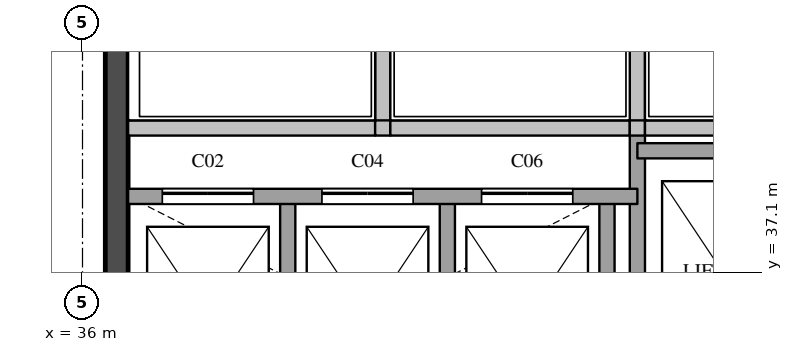
"""IFC4 building model, lengths in metres.
Left out: names, types, materials, properties, quantities, classifications, styles, units other than length and angle.
Written with IfcOpenShell. Run it as: python <this file> out.ifc"""

import sys

from ifc_helpers import new_model, si_unit, direction, frame, frame_2d, origin, place, context, subcontext, project, spatial, rectangle, extrude, element, fill, save


model = new_model("IFC4")
c1 = context("Model", 3, precision=1e-05, world=origin(), true_north=direction((0.0, 1.0)))
c2 = subcontext(c1, "Body", "Model", "MODEL_VIEW")
j1 = project(units=[si_unit("LENGTHUNIT", "METRE"), si_unit("PLANEANGLEUNIT", "RADIAN")], contexts=[c1])
p1 = place(None, origin())
s1 = spatial("IfcSite", under=j1, at=p1, CompositionType="ELEMENT")
p2 = place(p1, origin())
s2 = spatial("IfcBuilding", under=s1, at=p2, CompositionType="ELEMENT")
p3 = place(p2, frame((0.0, 0.0, 301.2)))
s3 = spatial("IfcBuildingStorey", under=s2, at=p3, CompositionType="ELEMENT", Elevation=301.2)
p4 = place(p3, frame((36.45, 29.1, 0.0), z_axis=(0.0, 0.0, 1.0), x_axis=(0.0, 1.0, 0.0)))
e1 = element("IfcWall", 1, at=p4, inside=s3, PredefinedType="SHEAR", context=c2, shape_type="SweptSolid", body=[
    extrude(rectangle(XDim=20.3, YDim=0.3, at=frame_2d((10.15, 0.0))), origin(), (0.0, 0.0, 1.0), 3.6),
])
p5 = place(p4, frame((3.6, 0.0, 0.0)))
e2 = element("IfcOpeningElement", 2, at=p5, cuts=e1, PredefinedType="OPENING", context=c2, shape_type="SweptSolid", body=[
    extrude(rectangle(XDim=1.8, YDim=2.1, at=frame_2d((0.9, 1.05))), frame((0.0, 0.16, 0.0), z_axis=(0.0, -1.0, 0.0), x_axis=(1.0, 0.0, 0.0)), (0.0, 0.0, 1.0), 0.32),
])
p6 = place(p4, frame((16.4, 0.0, 0.0)))
e3 = element("IfcOpeningElement", 3, at=p6, cuts=e1, PredefinedType="OPENING", context=c2, shape_type="SweptSolid", body=[
    extrude(rectangle(XDim=1.0, YDim=2.1, at=frame_2d((0.5, 1.05))), frame((0.0, 0.16, 0.0), z_axis=(0.0, -1.0, 0.0), x_axis=(1.0, 0.0, 0.0)), (0.0, 0.0, 1.0), 0.32),
])
p7 = place(p3, frame((38.7, 34.9, 0.0), z_axis=(0.0, 0.0, 1.0), x_axis=(0.0, 1.0, 0.0)))
e4 = element("IfcWall", 4, at=p7, inside=s3, PredefinedType="SOLIDWALL", context=c2, shape_type="SweptSolid", body=[
    extrude(rectangle(XDim=3.2, YDim=0.2, at=frame_2d((1.6, 0.0))), origin(), (0.0, 0.0, 1.0), 3.6),
])
p8 = place(p3, frame((39.95, 39.0, 0.0), z_axis=(0.0, 0.0, 1.0), x_axis=(0.0, 1.0, 0.0)))
e5 = element("IfcWall", 5, at=p8, inside=s3, PredefinedType="SOLIDWALL", context=c2, shape_type="SweptSolid", body=[
    extrude(rectangle(XDim=1.78, YDim=0.2, at=frame_2d((0.89, 0.0))), origin(), (0.0, 0.0, 1.0), 3.6),
])
for number, where, z_axis, x_axis in (
    (6, (40.8, 34.9, 0.0), (0.0, 0.0, 1.0), (0.0, 1.0, 0.0)),
    (7, (42.9, 34.9, 0.0), (0.0, 0.0, 1.0), (0.0, 1.0, 0.0)),
):
    element("IfcWall", number, at=place(p3, frame(where, z_axis=z_axis, x_axis=x_axis)), inside=s3, PredefinedType="SOLIDWALL", context=c2, shape_type="SweptSolid", body=[
        extrude(rectangle(XDim=3.2, YDim=0.2, at=frame_2d((1.6, 0.0))), origin(), (0.0, 0.0, 1.0), 3.6),
    ])
p9 = place(p3, frame((43.3, 29.1, 0.0), z_axis=(0.0, 0.0, 1.0), x_axis=(0.0, 1.0, 0.0)))
e8 = element("IfcWall", 8, at=p9, inside=s3, PredefinedType="SOLIDWALL", context=c2, shape_type="SweptSolid", body=[
    extrude(rectangle(XDim=9.9, YDim=0.2, at=frame_2d((4.95, 0.0))), origin(), (0.0, 0.0, 1.0), 3.6),
])
p10 = place(p3, frame((43.3, 39.0, 0.0), z_axis=(0.0, 0.0, 1.0), x_axis=(0.0, 1.0, 0.0)))
e9 = element("IfcWall", 9, at=p10, inside=s3, PredefinedType="SOLIDWALL", context=c2, shape_type="SweptSolid", body=[
    extrude(rectangle(XDim=1.78, YDim=0.2, at=frame_2d((0.89, 0.0))), origin(), (0.0, 0.0, 1.0), 3.6),
])
p11 = place(p3, frame((36.6, 38.1, 0.0), z_axis=(0.0, 0.0, 1.0), x_axis=(1.0, 0.0, 0.0)))
e10 = element("IfcWall", 10, at=p11, inside=s3, PredefinedType="SOLIDWALL", context=c2, shape_type="SweptSolid", body=[
    extrude(rectangle(XDim=6.7, YDim=0.2, at=frame_2d((3.35, 0.0))), origin(), (0.0, 0.0, 1.0), 3.6),
])
p12 = place(p11, frame((0.45, 0.0, 0.0)))
e11 = element("IfcOpeningElement", 11, at=p12, cuts=e10, PredefinedType="OPENING", context=c2, shape_type="SweptSolid", body=[
    extrude(rectangle(XDim=1.2, YDim=2.1, at=frame_2d((0.6, 1.05))), frame((0.0, 0.11, 0.0), z_axis=(0.0, -1.0, 0.0), x_axis=(1.0, 0.0, 0.0)), (0.0, 0.0, 1.0), 0.22),
])
p13 = place(p11, frame((2.55, 0.0, 0.0)))
e12 = element("IfcOpeningElement", 12, at=p13, cuts=e10, PredefinedType="OPENING", context=c2, shape_type="SweptSolid", body=[
    extrude(rectangle(XDim=1.2, YDim=2.1, at=frame_2d((0.6, 1.05))), frame((0.0, 0.11, 0.0), z_axis=(0.0, -1.0, 0.0), x_axis=(1.0, 0.0, 0.0)), (0.0, 0.0, 1.0), 0.22),
])
p14 = place(p11, frame((4.65, 0.0, 0.0)))
e13 = element("IfcOpeningElement", 13, at=p14, cuts=e10, PredefinedType="OPENING", context=c2, shape_type="SweptSolid", body=[
    extrude(rectangle(XDim=1.2, YDim=2.1, at=frame_2d((0.6, 1.05))), frame((0.0, 0.11, 0.0), z_axis=(0.0, -1.0, 0.0), x_axis=(1.0, 0.0, 0.0)), (0.0, 0.0, 1.0), 0.22),
])
p15 = place(p3, frame((43.3, 38.7, 0.0), z_axis=(0.0, 0.0, 1.0), x_axis=(1.0, 0.0, 0.0)))
e14 = element("IfcWall", 14, at=p15, inside=s3, PredefinedType="SOLIDWALL", context=c2, shape_type="SweptSolid", body=[
    extrude(rectangle(XDim=4.5, YDim=0.2, at=frame_2d((2.25, 0.0))), origin(), (0.0, 0.0, 1.0), 3.6),
])
p16 = place(p3, frame((36.6, 39.0, 0.0), z_axis=(0.0, 0.0, 1.0), x_axis=(1.0, 0.0, 0.0)))
e15 = element("IfcWall", 15, at=p16, inside=s3, PredefinedType="SOLIDWALL", context=c2, shape_type="SweptSolid", body=[
    extrude(rectangle(XDim=3.25, YDim=0.2, at=frame_2d((1.625, 0.0))), origin(), (0.0, 0.0, 1.0), 3.6),
])
p17 = place(p3, frame((39.85, 39.0, 0.0), z_axis=(0.0, 0.0, 1.0), x_axis=(1.0, 0.0, 0.0)))
e16 = element("IfcWall", 16, at=p17, inside=s3, PredefinedType="SOLIDWALL", context=c2, shape_type="SweptSolid", body=[
    extrude(rectangle(XDim=0.2, YDim=0.2, at=frame_2d((0.1, 0.0))), origin(), (0.0, 0.0, 1.0), 3.6),
])
p18 = place(p3, frame((40.05, 39.0, 0.0), z_axis=(0.0, 0.0, 1.0), x_axis=(1.0, 0.0, 0.0)))
e17 = element("IfcWall", 17, at=p18, inside=s3, PredefinedType="SOLIDWALL", context=c2, shape_type="SweptSolid", body=[
    extrude(rectangle(XDim=3.15, YDim=0.2, at=frame_2d((1.575, 0.0))), origin(), (0.0, 0.0, 1.0), 3.6),
])
p19 = place(p3, frame((43.2, 39.0, 0.0), z_axis=(0.0, 0.0, 1.0), x_axis=(1.0, 0.0, 0.0)))
e18 = element("IfcWall", 18, at=p19, inside=s3, PredefinedType="SOLIDWALL", context=c2, shape_type="SweptSolid", body=[
    extrude(rectangle(XDim=0.2, YDim=0.2, at=frame_2d((0.1, 0.0))), origin(), (0.0, 0.0, 1.0), 3.6),
])
p20 = place(p3, frame((43.4, 39.0, 0.0), z_axis=(0.0, 0.0, 1.0), x_axis=(1.0, 0.0, 0.0)))
e19 = element("IfcWall", 19, at=p20, inside=s3, PredefinedType="SOLIDWALL", context=c2, shape_type="SweptSolid", body=[
    extrude(rectangle(XDim=3.25, YDim=0.2, at=frame_2d((1.625, 0.0))), origin(), (0.0, 0.0, 1.0), 3.6),
])
p21 = place(p12, origin())
e20 = element("IfcDoor", 20, at=p21, inside=s3, OperationType="SLIDING_TO_LEFT", PredefinedType="DOOR", context=c2, shape_type="SweptSolid", body=[
    extrude(rectangle(XDim=1.2, YDim=2.1, at=frame_2d((0.6, 1.05))), frame((0.0, 0.025, 0.0), z_axis=(0.0, -1.0, 0.0), x_axis=(1.0, 0.0, 0.0)), (0.0, 0.0, 1.0), 0.05),
])
fill(e11, e20)
p22 = place(p13, origin())
e21 = element("IfcDoor", 21, at=p22, inside=s3, OperationType="SLIDING_TO_LEFT", PredefinedType="DOOR", context=c2, shape_type="SweptSolid", body=[
    extrude(rectangle(XDim=1.2, YDim=2.1, at=frame_2d((0.6, 1.05))), frame((0.0, 0.025, 0.0), z_axis=(0.0, -1.0, 0.0), x_axis=(1.0, 0.0, 0.0)), (0.0, 0.0, 1.0), 0.05),
])
fill(e12, e21)
p23 = place(p14, origin())
e22 = element("IfcDoor", 22, at=p23, inside=s3, OperationType="SLIDING_TO_LEFT", PredefinedType="DOOR", context=c2, shape_type="SweptSolid", body=[
    extrude(rectangle(XDim=1.2, YDim=2.1, at=frame_2d((0.6, 1.05))), frame((0.0, 0.025, 0.0), z_axis=(0.0, -1.0, 0.0), x_axis=(1.0, 0.0, 0.0)), (0.0, 0.0, 1.0), 0.05),
])
fill(e13, e22)
save(model, sys.argv[1])
